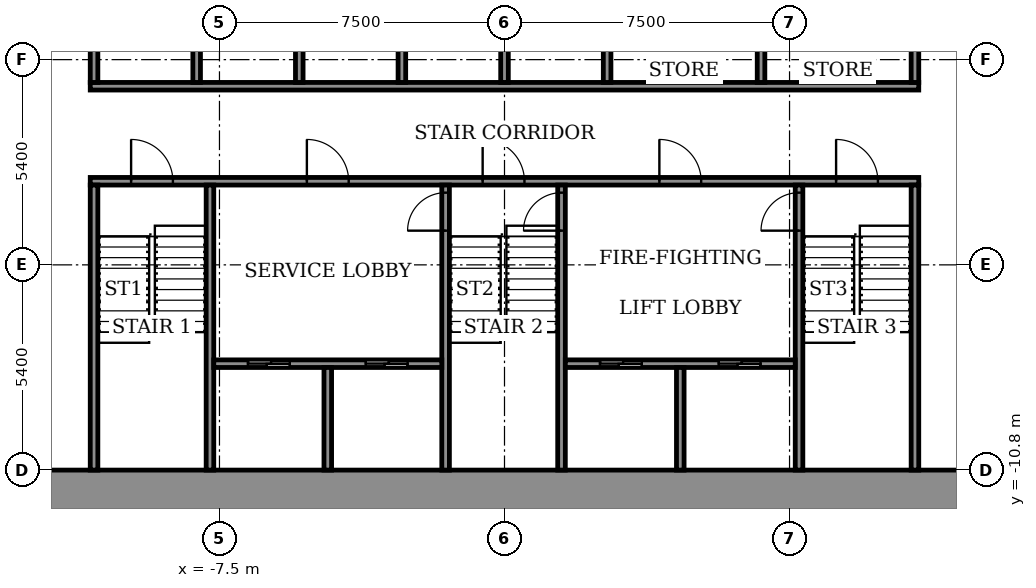
"""IFC4 building model, lengths in metres.
Left out: names, types, materials, properties, quantities, classifications, styles, units other than length and angle.
Written with IfcOpenShell. Run it as: python <this file> out.ifc"""

import sys

from ifc_helpers import new_model, si_unit, direction, frame, frame_2d, origin, place, context, subcontext, project, spatial, rectangle, extrude, element, fill, save


model = new_model("IFC4")
c1 = context("Model", 3, precision=1e-05, world=origin(), true_north=direction((0.0, 1.0)))
c2 = subcontext(c1, "Body", "Model", "MODEL_VIEW")
j1 = project(units=[si_unit("LENGTHUNIT", "METRE"), si_unit("PLANEANGLEUNIT", "RADIAN")], contexts=[c1])
p1 = place(None, origin())
s1 = spatial("IfcSite", under=j1, at=p1, CompositionType="ELEMENT")
p2 = place(p1, origin())
s2 = spatial("IfcBuilding", under=s1, at=p2, CompositionType="ELEMENT")
p3 = place(p2, frame((0.0, 0.0, 56.7)))
s3 = spatial("IfcBuildingStorey", under=s2, at=p3, CompositionType="ELEMENT", Elevation=56.7)
p4 = place(p3, frame((-14.9, -11.35, 0.0), z_axis=(0.0, 0.0, 1.0), x_axis=(1.0, 0.0, 0.0)))
e1 = element("IfcWall", 1, at=p4, inside=s3, PredefinedType="SHEAR", context=c2, shape_type="SweptSolid", body=[
    extrude(rectangle(XDim=29.8, YDim=1.1, at=frame_2d((14.9, 0.0))), origin(), (0.0, 0.0, 1.0), 3.6),
])
p5 = place(p3, frame((-10.9, -3.2, 0.0), z_axis=(0.0, 0.0, 1.0), x_axis=(1.0, 0.0, 0.0)))
e2 = element("IfcWall", 2, at=p5, inside=s3, PredefinedType="SHEAR", context=c2, shape_type="SweptSolid", body=[
    extrude(rectangle(XDim=21.8, YDim=0.2, at=frame_2d((10.9, 0.0))), origin(), (0.0, 0.0, 1.0), 3.05),
])
p6 = place(p5, frame((1.075, 0.0, 0.0)))
e3 = element("IfcOpeningElement", 3, at=p6, cuts=e2, PredefinedType="OPENING", context=c2, shape_type="SweptSolid", body=[
    extrude(rectangle(XDim=1.1, YDim=2.1, at=frame_2d((0.55, 1.05))), frame((0.0, 0.11, 0.0), z_axis=(0.0, -1.0, 0.0), x_axis=(1.0, 0.0, 0.0)), (0.0, 0.0, 1.0), 0.22),
])
p7 = place(p5, frame((10.325, 0.0, 0.0)))
e4 = element("IfcOpeningElement", 4, at=p7, cuts=e2, PredefinedType="OPENING", context=c2, shape_type="SweptSolid", body=[
    extrude(rectangle(XDim=1.1, YDim=2.1, at=frame_2d((0.55, 1.05))), frame((0.0, 0.11, 0.0), z_axis=(0.0, -1.0, 0.0), x_axis=(1.0, 0.0, 0.0)), (0.0, 0.0, 1.0), 0.22),
])
p8 = place(p5, frame((19.625, 0.0, 0.0)))
e5 = element("IfcOpeningElement", 5, at=p8, cuts=e2, PredefinedType="OPENING", context=c2, shape_type="SweptSolid", body=[
    extrude(rectangle(XDim=1.1, YDim=2.1, at=frame_2d((0.55, 1.05))), frame((0.0, 0.11, 0.0), z_axis=(0.0, -1.0, 0.0), x_axis=(1.0, 0.0, 0.0)), (0.0, 0.0, 1.0), 0.22),
])
p9 = place(p5, frame((5.7, 0.0, 0.0)))
e6 = element("IfcOpeningElement", 6, at=p9, cuts=e2, PredefinedType="OPENING", context=c2, shape_type="SweptSolid", body=[
    extrude(rectangle(XDim=1.1, YDim=2.1, at=frame_2d((0.55, 1.05))), frame((0.0, 0.11, 0.0), z_axis=(0.0, -1.0, 0.0), x_axis=(1.0, 0.0, 0.0)), (0.0, 0.0, 1.0), 0.22),
])
p10 = place(p5, frame((14.975, 0.0, 0.0)))
e7 = element("IfcOpeningElement", 7, at=p10, cuts=e2, PredefinedType="OPENING", context=c2, shape_type="SweptSolid", body=[
    extrude(rectangle(XDim=1.1, YDim=2.1, at=frame_2d((0.55, 1.05))), frame((0.0, 0.11, 0.0), z_axis=(0.0, -1.0, 0.0), x_axis=(1.0, 0.0, 0.0)), (0.0, 0.0, 1.0), 0.22),
])
p11 = place(p3, frame((-10.9, -0.7, 0.0), z_axis=(0.0, 0.0, 1.0), x_axis=(1.0, 0.0, 0.0)))
e8 = element("IfcWall", 8, at=p11, inside=s3, PredefinedType="SHEAR", context=c2, shape_type="SweptSolid", body=[
    extrude(rectangle(XDim=21.8, YDim=0.2, at=frame_2d((10.9, 0.0))), origin(), (0.0, 0.0, 1.0), 3.05),
])
for number, where, z_axis, x_axis in (
    (9, (-10.8, -10.8, 0.0), (0.0, 0.0, 1.0), (0.0, 1.0, 0.0)),
    (10, (-7.75, -10.8, 0.0), (0.0, 0.0, 1.0), (0.0, 1.0, 0.0)),
):
    element("IfcWall", number, at=place(p3, frame(where, z_axis=z_axis, x_axis=x_axis)), inside=s3, PredefinedType="SHEAR", context=c2, shape_type="SweptSolid", body=[
        extrude(rectangle(XDim=7.5, YDim=0.2, at=frame_2d((3.75, 0.0))), origin(), (0.0, 0.0, 1.0), 3.05),
    ])
p12 = place(p3, frame((-1.55, -10.8, 0.0), z_axis=(0.0, 0.0, 1.0), x_axis=(0.0, 1.0, 0.0)))
e11 = element("IfcWall", 11, at=p12, inside=s3, PredefinedType="SHEAR", context=c2, shape_type="SweptSolid", body=[
    extrude(rectangle(XDim=7.5, YDim=0.2, at=frame_2d((3.75, 0.0))), origin(), (0.0, 0.0, 1.0), 3.05),
])
p13 = place(p12, frame((6.3, 0.0, 0.0)))
e12 = element("IfcOpeningElement", 12, at=p13, cuts=e11, PredefinedType="OPENING", context=c2, shape_type="SweptSolid", body=[
    extrude(rectangle(XDim=1.0, YDim=2.1, at=frame_2d((0.5, 1.05))), frame((0.0, 0.11, 0.0), z_axis=(0.0, -1.0, 0.0), x_axis=(1.0, 0.0, 0.0)), (0.0, 0.0, 1.0), 0.22),
])
p14 = place(p3, frame((1.5, -10.8, 0.0), z_axis=(0.0, 0.0, 1.0), x_axis=(0.0, 1.0, 0.0)))
e13 = element("IfcWall", 13, at=p14, inside=s3, PredefinedType="SHEAR", context=c2, shape_type="SweptSolid", body=[
    extrude(rectangle(XDim=7.5, YDim=0.2, at=frame_2d((3.75, 0.0))), origin(), (0.0, 0.0, 1.0), 3.05),
])
p15 = place(p14, frame((6.3, 0.0, 0.0)))
e14 = element("IfcOpeningElement", 14, at=p15, cuts=e13, PredefinedType="OPENING", context=c2, shape_type="SweptSolid", body=[
    extrude(rectangle(XDim=1.0, YDim=2.1, at=frame_2d((0.5, 1.05))), frame((0.0, 0.11, 0.0), z_axis=(0.0, -1.0, 0.0), x_axis=(1.0, 0.0, 0.0)), (0.0, 0.0, 1.0), 0.22),
])
p16 = place(p3, frame((7.75, -10.8, 0.0), z_axis=(0.0, 0.0, 1.0), x_axis=(0.0, 1.0, 0.0)))
e15 = element("IfcWall", 15, at=p16, inside=s3, PredefinedType="SHEAR", context=c2, shape_type="SweptSolid", body=[
    extrude(rectangle(XDim=7.5, YDim=0.2, at=frame_2d((3.75, 0.0))), origin(), (0.0, 0.0, 1.0), 3.05),
])
p17 = place(p16, frame((6.3, 0.0, 0.0)))
e16 = element("IfcOpeningElement", 16, at=p17, cuts=e15, PredefinedType="OPENING", context=c2, shape_type="SweptSolid", body=[
    extrude(rectangle(XDim=1.0, YDim=2.1, at=frame_2d((0.5, 1.05))), frame((0.0, 0.11, 0.0), z_axis=(0.0, -1.0, 0.0), x_axis=(1.0, 0.0, 0.0)), (0.0, 0.0, 1.0), 0.22),
])
p18 = place(p3, frame((10.8, -10.8, 0.0), z_axis=(0.0, 0.0, 1.0), x_axis=(0.0, 1.0, 0.0)))
e17 = element("IfcWall", 17, at=p18, inside=s3, PredefinedType="SHEAR", context=c2, shape_type="SweptSolid", body=[
    extrude(rectangle(XDim=7.5, YDim=0.2, at=frame_2d((3.75, 0.0))), origin(), (0.0, 0.0, 1.0), 3.05),
])
p19 = place(p3, frame((-7.65, -8.0, 0.0), z_axis=(0.0, 0.0, 1.0), x_axis=(1.0, 0.0, 0.0)))
e18 = element("IfcWall", 18, at=p19, inside=s3, PredefinedType="SHEAR", context=c2, shape_type="SweptSolid", body=[
    extrude(rectangle(XDim=6.0, YDim=0.2, at=frame_2d((3.0, 0.0))), origin(), (0.0, 0.0, 1.0), 3.05),
])
p20 = place(p19, frame((0.9, 0.0, 0.0)))
e19 = element("IfcOpeningElement", 19, at=p20, cuts=e18, PredefinedType="OPENING", context=c2, shape_type="SweptSolid", body=[
    extrude(rectangle(XDim=1.1, YDim=2.1, at=frame_2d((0.55, 1.05))), frame((0.0, 0.11, 0.0), z_axis=(0.0, -1.0, 0.0), x_axis=(1.0, 0.0, 0.0)), (0.0, 0.0, 1.0), 0.22),
])
p21 = place(p19, frame((4.0, 0.0, 0.0)))
e20 = element("IfcOpeningElement", 20, at=p21, cuts=e18, PredefinedType="OPENING", context=c2, shape_type="SweptSolid", body=[
    extrude(rectangle(XDim=1.1, YDim=2.1, at=frame_2d((0.55, 1.05))), frame((0.0, 0.11, 0.0), z_axis=(0.0, -1.0, 0.0), x_axis=(1.0, 0.0, 0.0)), (0.0, 0.0, 1.0), 0.22),
])
p22 = place(p3, frame((-4.65, -10.8, 0.0), z_axis=(0.0, 0.0, 1.0), x_axis=(0.0, 1.0, 0.0)))
e21 = element("IfcWall", 21, at=p22, inside=s3, PredefinedType="SHEAR", context=c2, shape_type="SweptSolid", body=[
    extrude(rectangle(XDim=2.7, YDim=0.2, at=frame_2d((1.35, 0.0))), origin(), (0.0, 0.0, 1.0), 3.05),
])
p23 = place(p3, frame((1.6, -8.0, 0.0), z_axis=(0.0, 0.0, 1.0), x_axis=(1.0, 0.0, 0.0)))
e22 = element("IfcWall", 22, at=p23, inside=s3, PredefinedType="SHEAR", context=c2, shape_type="SweptSolid", body=[
    extrude(rectangle(XDim=6.05, YDim=0.2, at=frame_2d((3.025, 0.0))), origin(), (0.0, 0.0, 1.0), 3.05),
])
p24 = place(p23, frame((0.913, 0.0, 0.0)))
e23 = element("IfcOpeningElement", 23, at=p24, cuts=e22, PredefinedType="OPENING", context=c2, shape_type="SweptSolid", body=[
    extrude(rectangle(XDim=1.1, YDim=2.1, at=frame_2d((0.55, 1.05))), frame((0.0, 0.11, 0.0), z_axis=(0.0, -1.0, 0.0), x_axis=(1.0, 0.0, 0.0)), (0.0, 0.0, 1.0), 0.22),
])
p25 = place(p23, frame((4.038, 0.0, 0.0)))
e24 = element("IfcOpeningElement", 24, at=p25, cuts=e22, PredefinedType="OPENING", context=c2, shape_type="SweptSolid", body=[
    extrude(rectangle(XDim=1.1, YDim=2.1, at=frame_2d((0.55, 1.05))), frame((0.0, 0.11, 0.0), z_axis=(0.0, -1.0, 0.0), x_axis=(1.0, 0.0, 0.0)), (0.0, 0.0, 1.0), 0.22),
])
p26 = place(p3, frame((4.625, -10.8, 0.0), z_axis=(0.0, 0.0, 1.0), x_axis=(0.0, 1.0, 0.0)))
e25 = element("IfcWall", 25, at=p26, inside=s3, PredefinedType="SHEAR", context=c2, shape_type="SweptSolid", body=[
    extrude(rectangle(XDim=2.7, YDim=0.2, at=frame_2d((1.35, 0.0))), origin(), (0.0, 0.0, 1.0), 3.05),
])
for number, where, z_axis, x_axis in (
    (26, (-10.8, -0.6, 0.0), (0.0, 0.0, 1.0), (0.0, 1.0, 0.0)),
    (27, (-8.1, -0.6, 0.0), (0.0, 0.0, 1.0), (0.0, 1.0, 0.0)),
    (28, (-5.4, -0.6, 0.0), (0.0, 0.0, 1.0), (0.0, 1.0, 0.0)),
    (29, (-2.7, -0.6, 0.0), (0.0, 0.0, 1.0), (0.0, 1.0, 0.0)),
    (30, (0.0, -0.6, 0.0), (0.0, 0.0, 1.0), (0.0, 1.0, 0.0)),
    (31, (2.7, -0.6, 0.0), (0.0, 0.0, 1.0), (0.0, 1.0, 0.0)),
):
    element("IfcWall", number, at=place(p3, frame(where, z_axis=z_axis, x_axis=x_axis)), inside=s3, PredefinedType="SHEAR", context=c2, shape_type="SweptSolid", body=[
        extrude(rectangle(XDim=2.5, YDim=0.2, at=frame_2d((1.25, 0.0))), origin(), (0.0, 0.0, 1.0), 3.05),
    ])
for number, where, z_axis, x_axis in (
    (32, (6.75, -0.6, 0.0), (0.0, 0.0, 1.0), (0.0, 1.0, 0.0)),
    (33, (10.8, -0.6, 0.0), (0.0, 0.0, 1.0), (0.0, 1.0, 0.0)),
):
    element("IfcWall", number, at=place(p3, frame(where, z_axis=z_axis, x_axis=x_axis)), inside=s3, PredefinedType="STANDARD", context=c2, shape_type="SweptSolid", body=[
        extrude(rectangle(XDim=2.5, YDim=0.2, at=frame_2d((1.25, 0.0))), origin(), (0.0, 0.0, 1.0), 3.05),
    ])
p27 = place(p24, origin())
e34 = element("IfcDoor", 34, at=p27, inside=s3, OperationType="SLIDING_TO_LEFT", PredefinedType="DOOR", context=c2, shape_type="SweptSolid", body=[
    extrude(rectangle(XDim=1.1, YDim=2.1, at=frame_2d((0.55, 1.05))), frame((0.0, 0.025, 0.0), z_axis=(0.0, -1.0, 0.0), x_axis=(1.0, 0.0, 0.0)), (0.0, 0.0, 1.0), 0.05),
])
fill(e23, e34)
p28 = place(p20, origin())
e35 = element("IfcDoor", 35, at=p28, inside=s3, OperationType="SLIDING_TO_LEFT", PredefinedType="DOOR", context=c2, shape_type="SweptSolid", body=[
    extrude(rectangle(XDim=1.1, YDim=2.1, at=frame_2d((0.55, 1.05))), frame((0.0, 0.025, 0.0), z_axis=(0.0, -1.0, 0.0), x_axis=(1.0, 0.0, 0.0)), (0.0, 0.0, 1.0), 0.05),
])
fill(e19, e35)
p29 = place(p25, origin())
e36 = element("IfcDoor", 36, at=p29, inside=s3, OperationType="SLIDING_TO_LEFT", PredefinedType="DOOR", context=c2, shape_type="SweptSolid", body=[
    extrude(rectangle(XDim=1.1, YDim=2.1, at=frame_2d((0.55, 1.05))), frame((0.0, 0.025, 0.0), z_axis=(0.0, -1.0, 0.0), x_axis=(1.0, 0.0, 0.0)), (0.0, 0.0, 1.0), 0.05),
])
fill(e24, e36)
p30 = place(p21, origin())
e37 = element("IfcDoor", 37, at=p30, inside=s3, OperationType="SLIDING_TO_LEFT", PredefinedType="DOOR", context=c2, shape_type="SweptSolid", body=[
    extrude(rectangle(XDim=1.1, YDim=2.1, at=frame_2d((0.55, 1.05))), frame((0.0, 0.025, 0.0), z_axis=(0.0, -1.0, 0.0), x_axis=(1.0, 0.0, 0.0)), (0.0, 0.0, 1.0), 0.05),
])
fill(e20, e37)
p31 = place(p6, origin())
e38 = element("IfcDoor", 38, at=p31, inside=s3, OperationType="SINGLE_SWING_RIGHT", PredefinedType="DOOR", context=c2, shape_type="SweptSolid", body=[
    extrude(rectangle(XDim=1.1, YDim=2.1, at=frame_2d((0.55, 1.05))), frame((0.0, 0.025, 0.0), z_axis=(0.0, -1.0, 0.0), x_axis=(1.0, 0.0, 0.0)), (0.0, 0.0, 1.0), 0.05),
])
fill(e3, e38)
p32 = place(p7, origin())
e39 = element("IfcDoor", 39, at=p32, inside=s3, OperationType="SINGLE_SWING_RIGHT", PredefinedType="DOOR", context=c2, shape_type="SweptSolid", body=[
    extrude(rectangle(XDim=1.1, YDim=2.1, at=frame_2d((0.55, 1.05))), frame((0.0, 0.025, 0.0), z_axis=(0.0, -1.0, 0.0), x_axis=(1.0, 0.0, 0.0)), (0.0, 0.0, 1.0), 0.05),
])
fill(e4, e39)
p33 = place(p8, origin())
e40 = element("IfcDoor", 40, at=p33, inside=s3, OperationType="SINGLE_SWING_RIGHT", PredefinedType="DOOR", context=c2, shape_type="SweptSolid", body=[
    extrude(rectangle(XDim=1.1, YDim=2.1, at=frame_2d((0.55, 1.05))), frame((0.0, 0.025, 0.0), z_axis=(0.0, -1.0, 0.0), x_axis=(1.0, 0.0, 0.0)), (0.0, 0.0, 1.0), 0.05),
])
fill(e5, e40)
p34 = place(p9, origin())
e41 = element("IfcDoor", 41, at=p34, inside=s3, OperationType="SINGLE_SWING_LEFT", PredefinedType="DOOR", context=c2, shape_type="SweptSolid", body=[
    extrude(rectangle(XDim=1.1, YDim=2.1, at=frame_2d((0.55, 1.05))), frame((0.0, 0.025, 0.0), z_axis=(0.0, -1.0, 0.0), x_axis=(1.0, 0.0, 0.0)), (0.0, 0.0, 1.0), 0.05),
])
fill(e6, e41)
p35 = place(p10, origin())
e42 = element("IfcDoor", 42, at=p35, inside=s3, OperationType="SINGLE_SWING_LEFT", PredefinedType="DOOR", context=c2, shape_type="SweptSolid", body=[
    extrude(rectangle(XDim=1.1, YDim=2.1, at=frame_2d((0.55, 1.05))), frame((0.0, 0.025, 0.0), z_axis=(0.0, -1.0, 0.0), x_axis=(1.0, 0.0, 0.0)), (0.0, 0.0, 1.0), 0.05),
])
fill(e7, e42)
p36 = place(p13, origin())
e43 = element("IfcDoor", 43, at=p36, inside=s3, OperationType="SINGLE_SWING_RIGHT", PredefinedType="DOOR", context=c2, shape_type="SweptSolid", body=[
    extrude(rectangle(XDim=1.0, YDim=2.1, at=frame_2d((0.5, 1.05))), frame((0.0, 0.025, 0.0), z_axis=(0.0, -1.0, 0.0), x_axis=(1.0, 0.0, 0.0)), (0.0, 0.0, 1.0), 0.05),
])
fill(e12, e43)
p37 = place(p15, origin())
e44 = element("IfcDoor", 44, at=p37, inside=s3, OperationType="SINGLE_SWING_RIGHT", PredefinedType="DOOR", context=c2, shape_type="SweptSolid", body=[
    extrude(rectangle(XDim=1.0, YDim=2.1, at=frame_2d((0.5, 1.05))), frame((0.0, 0.025, 0.0), z_axis=(0.0, -1.0, 0.0), x_axis=(1.0, 0.0, 0.0)), (0.0, 0.0, 1.0), 0.05),
])
fill(e14, e44)
p38 = place(p17, origin())
e45 = element("IfcDoor", 45, at=p38, inside=s3, OperationType="SINGLE_SWING_RIGHT", PredefinedType="DOOR", context=c2, shape_type="SweptSolid", body=[
    extrude(rectangle(XDim=1.0, YDim=2.1, at=frame_2d((0.5, 1.05))), frame((0.0, 0.025, 0.0), z_axis=(0.0, -1.0, 0.0), x_axis=(1.0, 0.0, 0.0)), (0.0, 0.0, 1.0), 0.05),
])
fill(e16, e45)
save(model, sys.argv[1])
